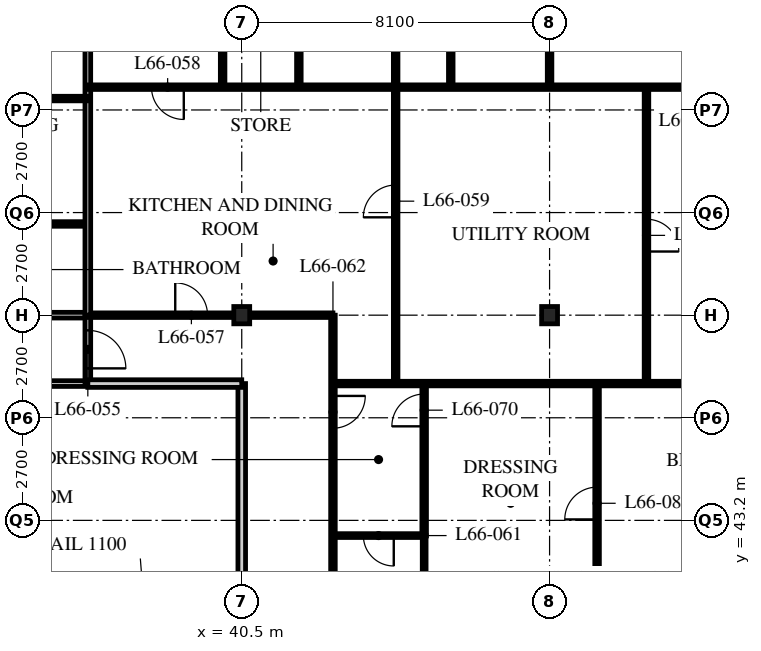
"""IFC4 building model, lengths in metres.
Left out: names, types, materials, properties, quantities, classifications, styles, units other than length and angle.
Written with IfcOpenShell. Run it as: python <this file> out.ifc"""

import sys

from ifc_helpers import new_model, si_unit, direction, frame, frame_2d, origin, origin_2d, place, context, subcontext, project, spatial, rectangle, i_section, extrude, element, fill, save


model = new_model("IFC4")
c1 = context("Model", 3, precision=1e-05, world=origin(), true_north=direction((0.0, 1.0)))
c2 = subcontext(c1, "Body", "Model", "MODEL_VIEW")
j1 = project(units=[si_unit("LENGTHUNIT", "METRE"), si_unit("PLANEANGLEUNIT", "RADIAN")], contexts=[c1])
p1 = place(None, origin())
s1 = spatial("IfcSite", under=j1, at=p1, CompositionType="ELEMENT")
p2 = place(p1, origin())
s2 = spatial("IfcBuilding", under=s1, at=p2, CompositionType="ELEMENT")
p3 = place(p2, frame((0.0, 0.0, 258.0)))
s3 = spatial("IfcBuildingStorey", under=s2, at=p3, CompositionType="ELEMENT", Elevation=258.0)
for number, where, z_axis, x_axis in (
    (1, (40.5, 48.6, 0.0), (0.0, 0.0, 1.0), (1.0, 0.0, 0.0)),
    (2, (48.6, 48.6, 0.0), (0.0, 0.0, 1.0), (1.0, 0.0, 0.0)),
):
    element("IfcColumn", number, at=place(p3, frame(where, z_axis=z_axis, x_axis=x_axis)), inside=s3, PredefinedType="COLUMN", context=c2, shape_type="SweptSolid", body=[
        extrude(i_section(OverallWidth=0.418, OverallDepth=0.456, WebThickness=0.042, FlangeThickness=0.067, FilletRadius=0.015, at=origin_2d()), origin(), (0.0, 0.0, 1.0), 3.9),
    ])
p4 = place(p3, frame((8.1, 48.6, 0.0), z_axis=(0.0, 0.0, 1.0), x_axis=(1.0, 0.0, 0.0)))
e3 = element("IfcWall", 3, at=p4, inside=s3, PredefinedType="PARTITIONING", context=c2, shape_type="SweptSolid", body=[
    extrude(rectangle(XDim=28.35, YDim=0.15, at=frame_2d((14.175, 0.0))), origin(), (0.0, 0.0, 1.0), 3.078),
])
p5 = place(p4, frame((4.45, 0.0, 0.0)))
e4 = element("IfcOpeningElement", 4, at=p5, cuts=e3, PredefinedType="OPENING", context=c2, shape_type="SweptSolid", body=[
    extrude(rectangle(XDim=1.0, YDim=2.1, at=frame_2d((0.5, 1.05))), frame((0.0, 0.085, 0.0), z_axis=(0.0, -1.0, 0.0), x_axis=(1.0, 0.0, 0.0)), (0.0, 0.0, 1.0), 0.17),
])
p6 = place(p4, frame((20.65, 0.0, 0.0)))
e5 = element("IfcOpeningElement", 5, at=p6, cuts=e3, PredefinedType="OPENING", context=c2, shape_type="SweptSolid", body=[
    extrude(rectangle(XDim=1.0, YDim=2.1, at=frame_2d((0.5, 1.05))), frame((0.0, 0.085, 0.0), z_axis=(0.0, -1.0, 0.0), x_axis=(1.0, 0.0, 0.0)), (0.0, 0.0, 1.0), 0.17),
])
p7 = place(p4, frame((1.525, 0.0, 0.0)))
e6 = element("IfcOpeningElement", 6, at=p7, cuts=e3, PredefinedType="OPENING", context=c2, shape_type="SweptSolid", body=[
    extrude(rectangle(XDim=1.0, YDim=2.1, at=frame_2d((0.5, 1.05))), frame((0.0, 0.085, 0.0), z_axis=(0.0, -1.0, 0.0), x_axis=(1.0, 0.0, 0.0)), (0.0, 0.0, 1.0), 0.17),
])
p8 = place(p3, frame((29.56, 46.8, 0.0), z_axis=(0.0, 0.0, 1.0), x_axis=(1.0, 0.0, 0.0)))
e7 = element("IfcWall", 7, at=p8, inside=s3, PredefinedType="PARTITIONING", context=c2, shape_type="SweptSolid", body=[
    extrude(rectangle(XDim=6.89, YDim=0.15, at=frame_2d((3.445, 0.0))), origin(), (0.0, 0.0, 1.0), 3.69),
])
p9 = place(p8, frame((0.442, 0.0, 0.0)))
e8 = element("IfcOpeningElement", 8, at=p9, cuts=e7, PredefinedType="OPENING", context=c2, shape_type="SweptSolid", body=[
    extrude(rectangle(XDim=1.0, YDim=2.1, at=frame_2d((0.5, 1.05))), frame((0.0, 0.085, 0.0), z_axis=(0.0, -1.0, 0.0), x_axis=(1.0, 0.0, 0.0)), (0.0, 0.0, 1.0), 0.17),
])
p10 = place(p8, frame((3.642, 0.0, 0.0)))
e9 = element("IfcOpeningElement", 9, at=p10, cuts=e7, PredefinedType="OPENING", context=c2, shape_type="SweptSolid", body=[
    extrude(rectangle(XDim=1.0, YDim=2.1, at=frame_2d((0.5, 1.05))), frame((0.0, 0.085, 0.0), z_axis=(0.0, -1.0, 0.0), x_axis=(1.0, 0.0, 0.0)), (0.0, 0.0, 1.0), 0.17),
])
p11 = place(p3, frame((36.45, 46.8, 0.0), z_axis=(0.0, 0.0, 1.0), x_axis=(0.0, 1.0, 0.0)))
e10 = element("IfcWall", 10, at=p11, inside=s3, PredefinedType="PARTITIONING", context=c2, shape_type="SweptSolid", body=[
    extrude(rectangle(XDim=1.8, YDim=0.15, at=frame_2d((0.9, 0.0))), origin(), (0.0, 0.0, 1.0), 3.69),
])
p12 = place(p11, frame((0.4, 0.0, 0.0)))
e11 = element("IfcOpeningElement", 11, at=p12, cuts=e10, PredefinedType="OPENING", context=c2, shape_type="SweptSolid", body=[
    extrude(rectangle(XDim=1.0, YDim=2.1, at=frame_2d((0.5, 1.05))), frame((0.0, 0.085, 0.0), z_axis=(0.0, -1.0, 0.0), x_axis=(1.0, 0.0, 0.0)), (0.0, 0.0, 1.0), 0.17),
])
p13 = place(p3, frame((40.5, 40.5, 0.0), z_axis=(0.0, 0.0, 1.0), x_axis=(0.0, 1.0, 0.0)))
e12 = element("IfcWall", 12, at=p13, inside=s3, PredefinedType="SOLIDWALL", context=c2, shape_type="SweptSolid", body=[
    extrude(rectangle(XDim=6.3, YDim=0.2, at=frame_2d((3.15, 0.0))), origin(), (0.0, 0.0, 1.0), 3.078),
])
p14 = place(p3, frame((4.1, 51.0, 0.0), z_axis=(0.0, 0.0, 1.0), x_axis=(1.0, 0.0, 0.0)))
e13 = element("IfcWall", 13, at=p14, inside=s3, PredefinedType="PARTITIONING", context=c2, shape_type="SweptSolid", body=[
    extrude(rectangle(XDim=32.35, YDim=0.12, at=frame_2d((16.175, 0.0))), origin(), (0.0, 0.0, 1.0), 3.69),
])
p15 = place(p14, frame((9.025, 0.0, 0.0)))
e14 = element("IfcOpeningElement", 14, at=p15, cuts=e13, PredefinedType="OPENING", context=c2, shape_type="SweptSolid", body=[
    extrude(rectangle(XDim=0.85, YDim=2.1, at=frame_2d((0.425, 1.05))), frame((0.0, 0.07, 0.0), z_axis=(0.0, -1.0, 0.0), x_axis=(1.0, 0.0, 0.0)), (0.0, 0.0, 1.0), 0.14),
])
p16 = place(p14, frame((16.475, 0.0, 0.0)))
e15 = element("IfcOpeningElement", 15, at=p16, cuts=e13, PredefinedType="OPENING", context=c2, shape_type="SweptSolid", body=[
    extrude(rectangle(XDim=0.85, YDim=2.1, at=frame_2d((0.425, 1.05))), frame((0.0, 0.07, 0.0), z_axis=(0.0, -1.0, 0.0), x_axis=(1.0, 0.0, 0.0)), (0.0, 0.0, 1.0), 0.14),
])
p17 = place(p14, frame((20.525, 0.0, 0.0)))
e16 = element("IfcOpeningElement", 16, at=p17, cuts=e13, PredefinedType="OPENING", context=c2, shape_type="SweptSolid", body=[
    extrude(rectangle(XDim=0.85, YDim=2.1, at=frame_2d((0.425, 1.05))), frame((0.0, 0.07, 0.0), z_axis=(0.0, -1.0, 0.0), x_axis=(1.0, 0.0, 0.0)), (0.0, 0.0, 1.0), 0.14),
])
p18 = place(p14, frame((25.225, 0.0, 0.0)))
e17 = element("IfcOpeningElement", 17, at=p18, cuts=e13, PredefinedType="OPENING", context=c2, shape_type="SweptSolid", body=[
    extrude(rectangle(XDim=0.85, YDim=2.1, at=frame_2d((0.425, 1.05))), frame((0.0, 0.07, 0.0), z_axis=(0.0, -1.0, 0.0), x_axis=(1.0, 0.0, 0.0)), (0.0, 0.0, 1.0), 0.14),
])
p19 = place(p14, frame((28.625, 0.0, 0.0)))
e18 = element("IfcOpeningElement", 18, at=p19, cuts=e13, PredefinedType="OPENING", context=c2, shape_type="SweptSolid", body=[
    extrude(rectangle(XDim=0.85, YDim=2.1, at=frame_2d((0.425, 1.05))), frame((0.0, 0.07, 0.0), z_axis=(0.0, -1.0, 0.0), x_axis=(1.0, 0.0, 0.0)), (0.0, 0.0, 1.0), 0.14),
])
p20 = place(p14, frame((6.725, 0.0, 0.0)))
e19 = element("IfcOpeningElement", 19, at=p20, cuts=e13, PredefinedType="OPENING", context=c2, shape_type="SweptSolid", body=[
    extrude(rectangle(XDim=0.85, YDim=2.1, at=frame_2d((0.425, 1.05))), frame((0.0, 0.07, 0.0), z_axis=(0.0, -1.0, 0.0), x_axis=(1.0, 0.0, 0.0)), (0.0, 0.0, 1.0), 0.14),
])
p21 = place(p14, frame((2.875, 0.0, 0.0)))
e20 = element("IfcOpeningElement", 20, at=p21, cuts=e13, PredefinedType="OPENING", context=c2, shape_type="SweptSolid", body=[
    extrude(rectangle(XDim=0.85, YDim=2.1, at=frame_2d((0.425, 1.05))), frame((0.0, 0.07, 0.0), z_axis=(0.0, -1.0, 0.0), x_axis=(1.0, 0.0, 0.0)), (0.0, 0.0, 1.0), 0.14),
])
p22 = place(p3, frame((42.9, 48.6, 0.0), z_axis=(0.0, 0.0, 1.0), x_axis=(0.0, -1.0, 0.0)))
e21 = element("IfcWall", 21, at=p22, inside=s3, PredefinedType="PARTITIONING", context=c2, shape_type="SweptSolid", body=[
    extrude(rectangle(XDim=16.2, YDim=0.12, at=frame_2d((8.1, 0.0))), origin(), (0.0, 0.0, 1.0), 3.69),
])
p23 = place(p22, frame((2.125, 0.0, 0.0)))
e22 = element("IfcOpeningElement", 22, at=p23, cuts=e21, PredefinedType="OPENING", context=c2, shape_type="SweptSolid", body=[
    extrude(rectangle(XDim=0.85, YDim=2.1, at=frame_2d((0.425, 1.05))), frame((0.0, 0.07, 0.0), z_axis=(0.0, -1.0, 0.0), x_axis=(1.0, 0.0, 0.0)), (0.0, 0.0, 1.0), 0.14),
])
p24 = place(p22, frame((8.425, 0.0, 0.0)))
e23 = element("IfcOpeningElement", 23, at=p24, cuts=e21, PredefinedType="OPENING", context=c2, shape_type="SweptSolid", body=[
    extrude(rectangle(XDim=0.85, YDim=2.1, at=frame_2d((0.425, 1.05))), frame((0.0, 0.07, 0.0), z_axis=(0.0, -1.0, 0.0), x_axis=(1.0, 0.0, 0.0)), (0.0, 0.0, 1.0), 0.14),
])
p25 = place(p22, frame((12.475, 0.0, 0.0)))
e24 = element("IfcOpeningElement", 24, at=p25, cuts=e21, PredefinedType="OPENING", context=c2, shape_type="SweptSolid", body=[
    extrude(rectangle(XDim=0.85, YDim=2.1, at=frame_2d((0.425, 1.05))), frame((0.0, 0.07, 0.0), z_axis=(0.0, -1.0, 0.0), x_axis=(1.0, 0.0, 0.0)), (0.0, 0.0, 1.0), 0.14),
])
p26 = place(p3, frame((36.45, 48.6, 0.0), z_axis=(0.0, 0.0, 1.0), x_axis=(1.0, 0.0, 0.0)))
e25 = element("IfcWall", 25, at=p26, inside=s3, PredefinedType="PARTITIONING", context=c2, shape_type="SweptSolid", body=[
    extrude(rectangle(XDim=6.45, YDim=0.12, at=frame_2d((3.225, 0.0))), origin(), (0.0, 0.0, 1.0), 3.078),
])
p27 = place(p26, frame((2.3, 0.0, 0.0)))
e26 = element("IfcOpeningElement", 26, at=p27, cuts=e25, PredefinedType="OPENING", context=c2, shape_type="SweptSolid", body=[
    extrude(rectangle(XDim=0.85, YDim=2.1, at=frame_2d((0.425, 1.05))), frame((0.0, 0.07, 0.0), z_axis=(0.0, -1.0, 0.0), x_axis=(1.0, 0.0, 0.0)), (0.0, 0.0, 1.0), 0.14),
])
p28 = place(p3, frame((36.45, 46.8, 0.0), z_axis=(0.0, 0.0, 1.0), x_axis=(1.0, 0.0, 0.0)))
e27 = element("IfcWall", 27, at=p28, inside=s3, PredefinedType="SOLIDWALL", context=c2, shape_type="SweptSolid", body=[
    extrude(rectangle(XDim=4.05, YDim=0.2, at=frame_2d((2.025, 0.0))), origin(), (0.0, 0.0, 1.0), 3.69),
])
p29 = place(p3, frame((42.9, 46.8, 0.0), z_axis=(0.0, 0.0, 1.0), x_axis=(1.0, 0.0, 0.0)))
e28 = element("IfcWall", 28, at=p29, inside=s3, PredefinedType="PARTITIONING", context=c2, shape_type="SweptSolid", body=[
    extrude(rectangle(XDim=13.5, YDim=0.12, at=frame_2d((6.75, 0.0))), origin(), (0.0, 0.0, 1.0), 3.69),
])
p30 = place(p3, frame((36.45, 64.5, 0.0), z_axis=(0.0, 0.0, 1.0), x_axis=(0.0, -1.0, 0.0)))
e29 = element("IfcWall", 29, at=p30, inside=s3, PredefinedType="PARTITIONING", context=c2, shape_type="SweptSolid", body=[
    extrude(rectangle(XDim=15.9, YDim=0.15, at=frame_2d((7.95, 0.0))), origin(), (0.0, 0.0, 1.0), 3.69),
])
p31 = place(p3, frame((36.45, 54.6, 0.0), z_axis=(0.0, 0.0, 1.0), x_axis=(1.0, 0.0, 0.0)))
e30 = element("IfcWall", 30, at=p31, inside=s3, PredefinedType="PARTITIONING", context=c2, shape_type="SweptSolid", body=[
    extrude(rectangle(XDim=19.95, YDim=0.12, at=frame_2d((9.975, 0.0))), origin(), (0.0, 0.0, 1.0), 3.69),
])
p32 = place(p31, frame((1.675, 0.0, 0.0)))
e31 = element("IfcOpeningElement", 31, at=p32, cuts=e30, PredefinedType="OPENING", context=c2, shape_type="SweptSolid", body=[
    extrude(rectangle(XDim=0.85, YDim=2.1, at=frame_2d((0.425, 1.05))), frame((0.0, 0.07, 0.0), z_axis=(0.0, -1.0, 0.0), x_axis=(1.0, 0.0, 0.0)), (0.0, 0.0, 1.0), 0.14),
])
p33 = place(p3, frame((44.55, 64.5, 0.0), z_axis=(0.0, 0.0, 1.0), x_axis=(0.0, -1.0, 0.0)))
e32 = element("IfcWall", 32, at=p33, inside=s3, PredefinedType="PARTITIONING", context=c2, shape_type="SweptSolid", body=[
    extrude(rectangle(XDim=17.7, YDim=0.12, at=frame_2d((8.85, 0.0))), origin(), (0.0, 0.0, 1.0), 3.69),
])
p34 = place(p33, frame((12.475, 0.0, 0.0)))
e33 = element("IfcOpeningElement", 33, at=p34, cuts=e32, PredefinedType="OPENING", context=c2, shape_type="SweptSolid", body=[
    extrude(rectangle(XDim=0.85, YDim=2.1, at=frame_2d((0.425, 1.05))), frame((0.0, 0.07, 0.0), z_axis=(0.0, -1.0, 0.0), x_axis=(1.0, 0.0, 0.0)), (0.0, 0.0, 1.0), 0.14),
])
p35 = place(p33, frame((4.525, 0.0, 0.0)))
e34 = element("IfcOpeningElement", 34, at=p35, cuts=e32, PredefinedType="OPENING", context=c2, shape_type="SweptSolid", body=[
    extrude(rectangle(XDim=0.85, YDim=2.1, at=frame_2d((0.425, 1.05))), frame((0.0, 0.07, 0.0), z_axis=(0.0, -1.0, 0.0), x_axis=(1.0, 0.0, 0.0)), (0.0, 0.0, 1.0), 0.14),
])
p36 = place(p3, frame((42.9, 42.8, 0.0), z_axis=(0.0, 0.0, 1.0), x_axis=(1.0, 0.0, 0.0)))
e35 = element("IfcWall", 35, at=p36, inside=s3, PredefinedType="PARTITIONING", context=c2, shape_type="SweptSolid", body=[
    extrude(rectangle(XDim=2.4, YDim=0.1, at=frame_2d((1.2, 0.0))), origin(), (0.0, 0.0, 1.0), 3.69),
])
p37 = place(p36, frame((0.8, 0.0, 0.0)))
e36 = element("IfcOpeningElement", 36, at=p37, cuts=e35, PredefinedType="OPENING", context=c2, shape_type="SweptSolid", body=[
    extrude(rectangle(XDim=0.8, YDim=2.1, at=frame_2d((0.4, 1.05))), frame((0.0, 0.06, 0.0), z_axis=(0.0, -1.0, 0.0), x_axis=(1.0, 0.0, 0.0)), (0.0, 0.0, 1.0), 0.12),
])
p38 = place(p3, frame((45.3, 42.8, 0.0), z_axis=(0.0, 0.0, 1.0), x_axis=(0.0, -1.0, 0.0)))
e37 = element("IfcWall", 37, at=p38, inside=s3, PredefinedType="PARTITIONING", context=c2, shape_type="SweptSolid", body=[
    extrude(rectangle(XDim=2.3, YDim=0.1, at=frame_2d((1.15, 0.0))), origin(), (0.0, 0.0, 1.0), 3.69),
])
p39 = place(p3, frame((45.3, 46.8, 0.0), z_axis=(0.0, 0.0, 1.0), x_axis=(0.0, -1.0, 0.0)))
e38 = element("IfcWall", 38, at=p39, inside=s3, PredefinedType="PARTITIONING", context=c2, shape_type="SweptSolid", body=[
    extrude(rectangle(XDim=4.01, YDim=0.12, at=frame_2d((2.005, 0.0))), origin(), (0.0, 0.0, 1.0), 3.69),
])
p40 = place(p39, frame((0.275, 0.0, 0.0)))
e39 = element("IfcOpeningElement", 39, at=p40, cuts=e38, PredefinedType="OPENING", context=c2, shape_type="SweptSolid", body=[
    extrude(rectangle(XDim=0.85, YDim=2.1, at=frame_2d((0.425, 1.05))), frame((0.0, 0.07, 0.0), z_axis=(0.0, -1.0, 0.0), x_axis=(1.0, 0.0, 0.0)), (0.0, 0.0, 1.0), 0.14),
])
p41 = place(p3, frame((32.4, 54.3, 0.0), z_axis=(0.0, 0.0, 1.0), x_axis=(1.0, 0.0, 0.0)))
e40 = element("IfcWall", 40, at=p41, inside=s3, PredefinedType="PARTITIONING", context=c2, shape_type="SweptSolid", body=[
    extrude(rectangle(XDim=4.05, YDim=0.12, at=frame_2d((2.025, 0.0))), origin(), (0.0, 0.0, 1.0), 3.69),
])
p42 = place(p41, frame((1.6, 0.0, 0.0)))
e41 = element("IfcOpeningElement", 41, at=p42, cuts=e40, PredefinedType="OPENING", context=c2, shape_type="SweptSolid", body=[
    extrude(rectangle(XDim=0.85, YDim=2.1, at=frame_2d((0.425, 1.05))), frame((0.0, 0.07, 0.0), z_axis=(0.0, -1.0, 0.0), x_axis=(1.0, 0.0, 0.0)), (0.0, 0.0, 1.0), 0.14),
])
p43 = place(p3, frame((51.15, 46.8, 0.0), z_axis=(0.0, 0.0, 1.0), x_axis=(0.0, 1.0, 0.0)))
e42 = element("IfcWall", 42, at=p43, inside=s3, PredefinedType="PARTITIONING", context=c2, shape_type="SweptSolid", body=[
    extrude(rectangle(XDim=7.8, YDim=0.12, at=frame_2d((3.9, 0.0))), origin(), (0.0, 0.0, 1.0), 3.69),
])
p44 = place(p43, frame((3.475, 0.0, 0.0)))
e43 = element("IfcOpeningElement", 43, at=p44, cuts=e42, PredefinedType="OPENING", context=c2, shape_type="SweptSolid", body=[
    extrude(rectangle(XDim=0.85, YDim=2.1, at=frame_2d((0.425, 1.05))), frame((0.0, 0.07, 0.0), z_axis=(0.0, -1.0, 0.0), x_axis=(1.0, 0.0, 0.0)), (0.0, 0.0, 1.0), 0.14),
])
p45 = place(p3, frame((46.0, 54.6, 0.0), z_axis=(0.0, 0.0, 1.0), x_axis=(0.0, 1.0, 0.0)))
e44 = element("IfcWall", 44, at=p45, inside=s3, PredefinedType="PARTITIONING", context=c2, shape_type="SweptSolid", body=[
    extrude(rectangle(XDim=5.85, YDim=0.12, at=frame_2d((2.925, 0.0))), origin(), (0.0, 0.0, 1.0), 3.69),
])
p46 = place(p45, frame((2.5, 0.0, 0.0)))
e45 = element("IfcOpeningElement", 45, at=p46, cuts=e44, PredefinedType="OPENING", context=c2, shape_type="SweptSolid", body=[
    extrude(rectangle(XDim=0.85, YDim=2.1, at=frame_2d((0.425, 1.05))), frame((0.0, 0.07, 0.0), z_axis=(0.0, -1.0, 0.0), x_axis=(1.0, 0.0, 0.0)), (0.0, 0.0, 1.0), 0.14),
])
p47 = place(p3, frame((49.85, 40.5, 0.0), z_axis=(0.0, 0.0, 1.0), x_axis=(0.0, 1.0, 0.0)))
e46 = element("IfcWall", 46, at=p47, inside=s3, PredefinedType="PARTITIONING", context=c2, shape_type="SweptSolid", body=[
    extrude(rectangle(XDim=6.3, YDim=0.12, at=frame_2d((3.15, 0.0))), origin(), (0.0, 0.0, 1.0), 3.69),
])
p48 = place(p47, frame((2.725, 0.0, 0.0)))
e47 = element("IfcOpeningElement", 47, at=p48, cuts=e46, PredefinedType="OPENING", context=c2, shape_type="SweptSolid", body=[
    extrude(rectangle(XDim=0.85, YDim=2.1, at=frame_2d((0.425, 1.05))), frame((0.0, 0.07, 0.0), z_axis=(0.0, -1.0, 0.0), x_axis=(1.0, 0.0, 0.0)), (0.0, 0.0, 1.0), 0.14),
])
for number, where, z_axis, x_axis in (
    (48, (39.997, 54.6, 0.0), (0.0, 0.0, 1.0), (0.0, 1.0, 0.0)),
    (49, (42.003, 54.6, 0.0), (0.0, 0.0, 1.0), (0.0, 1.0, 0.0)),
):
    element("IfcWall", number, at=place(p3, frame(where, z_axis=z_axis, x_axis=x_axis)), inside=s3, PredefinedType="PARTITIONING", context=c2, shape_type="SweptSolid", body=[
        extrude(rectangle(XDim=2.363, YDim=0.12, at=frame_2d((1.181, 0.0))), origin(), (0.0, 0.0, 1.0), 3.69),
    ])
p49 = place(p3, frame((48.6, 54.6, 0.0), z_axis=(0.0, 0.0, 1.0), x_axis=(0.0, 1.0, 0.0)))
e50 = element("IfcWall", 50, at=p49, inside=s3, PredefinedType="PARTITIONING", context=c2, shape_type="SweptSolid", body=[
    extrude(rectangle(XDim=1.897, YDim=0.12, at=frame_2d((0.948, 0.0))), origin(), (0.0, 0.0, 1.0), 3.078),
])
p50 = place(p12, origin())
e51 = element("IfcDoor", 51, at=p50, inside=s3, OperationType="SINGLE_SWING_RIGHT", PredefinedType="DOOR", context=c2, shape_type="SweptSolid", body=[
    extrude(rectangle(XDim=1.0, YDim=2.1, at=frame_2d((0.5, 1.05))), frame((0.0, 0.025, 0.0), z_axis=(0.0, -1.0, 0.0), x_axis=(1.0, 0.0, 0.0)), (0.0, 0.0, 1.0), 0.05),
])
fill(e11, e51)
p51 = place(p27, origin())
e52 = element("IfcDoor", 52, at=p51, inside=s3, OperationType="SINGLE_SWING_LEFT", PredefinedType="DOOR", context=c2, shape_type="SweptSolid", body=[
    extrude(rectangle(XDim=0.85, YDim=2.1, at=frame_2d((0.425, 1.05))), frame((0.0, 0.025, 0.0), z_axis=(0.0, -1.0, 0.0), x_axis=(1.0, 0.0, 0.0)), (0.0, 0.0, 1.0), 0.05),
])
fill(e26, e52)
p52 = place(p32, origin())
e53 = element("IfcDoor", 53, at=p52, inside=s3, OperationType="SINGLE_SWING_LEFT", PredefinedType="DOOR", context=c2, shape_type="SweptSolid", body=[
    extrude(rectangle(XDim=0.85, YDim=2.1, at=frame_2d((0.425, 1.05))), frame((0.0, 0.025, 0.0), z_axis=(0.0, -1.0, 0.0), x_axis=(1.0, 0.0, 0.0)), (0.0, 0.0, 1.0), 0.05),
])
fill(e31, e53)
p53 = place(p34, origin())
e54 = element("IfcDoor", 54, at=p53, inside=s3, OperationType="SINGLE_SWING_LEFT", PredefinedType="DOOR", context=c2, shape_type="SweptSolid", body=[
    extrude(rectangle(XDim=0.85, YDim=2.1, at=frame_2d((0.425, 1.05))), frame((0.0, 0.025, 0.0), z_axis=(0.0, -1.0, 0.0), x_axis=(1.0, 0.0, 0.0)), (0.0, 0.0, 1.0), 0.05),
])
fill(e33, e54)
p54 = place(p37, origin())
e55 = element("IfcDoor", 55, at=p54, inside=s3, OperationType="SINGLE_SWING_LEFT", PredefinedType="DOOR", context=c2, shape_type="SweptSolid", body=[
    extrude(rectangle(XDim=0.8, YDim=2.1, at=frame_2d((0.4, 1.05))), frame((0.0, 0.025, 0.0), z_axis=(0.0, -1.0, 0.0), x_axis=(1.0, 0.0, 0.0)), (0.0, 0.0, 1.0), 0.05),
])
fill(e36, e55)
p55 = place(p23, origin())
e56 = element("IfcDoor", 56, at=p55, inside=s3, OperationType="SINGLE_SWING_LEFT", PredefinedType="DOOR", context=c2, shape_type="SweptSolid", body=[
    extrude(rectangle(XDim=0.85, YDim=2.1, at=frame_2d((0.425, 1.05))), frame((0.0, 0.025, 0.0), z_axis=(0.0, -1.0, 0.0), x_axis=(1.0, 0.0, 0.0)), (0.0, 0.0, 1.0), 0.05),
])
fill(e22, e56)
p56 = place(p40, origin())
e57 = element("IfcDoor", 57, at=p56, inside=s3, OperationType="SINGLE_SWING_LEFT", PredefinedType="DOOR", context=c2, shape_type="SweptSolid", body=[
    extrude(rectangle(XDim=0.85, YDim=2.1, at=frame_2d((0.425, 1.05))), frame((0.0, 0.025, 0.0), z_axis=(0.0, -1.0, 0.0), x_axis=(1.0, 0.0, 0.0)), (0.0, 0.0, 1.0), 0.05),
])
fill(e39, e57)
p57 = place(p44, origin())
e58 = element("IfcDoor", 58, at=p57, inside=s3, OperationType="SINGLE_SWING_RIGHT", PredefinedType="DOOR", context=c2, shape_type="SweptSolid", body=[
    extrude(rectangle(XDim=0.85, YDim=2.1, at=frame_2d((0.425, 1.05))), frame((0.0, 0.025, 0.0), z_axis=(0.0, -1.0, 0.0), x_axis=(1.0, 0.0, 0.0)), (0.0, 0.0, 1.0), 0.05),
])
fill(e43, e58)
p58 = place(p48, origin())
e59 = element("IfcDoor", 59, at=p58, inside=s3, OperationType="SINGLE_SWING_LEFT", PredefinedType="DOOR", context=c2, shape_type="SweptSolid", body=[
    extrude(rectangle(XDim=0.85, YDim=2.1, at=frame_2d((0.425, 1.05))), frame((0.0, 0.025, 0.0), z_axis=(0.0, -1.0, 0.0), x_axis=(1.0, 0.0, 0.0)), (0.0, 0.0, 1.0), 0.05),
])
fill(e47, e59)
save(model, sys.argv[1])
